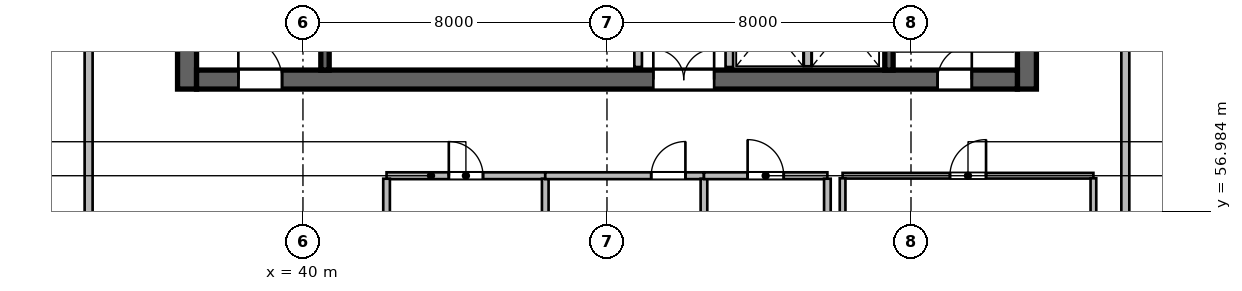
"""IFC4 building model, lengths in metres.
Left out: names, types, materials, properties, quantities, classifications, styles, units other than length and angle.
Written with IfcOpenShell. Run it as: python <this file> out.ifc"""

import sys

from ifc_helpers import new_model, si_unit, direction, frame, frame_2d, origin, place, context, subcontext, project, spatial, rectangle, extrude, source, transform, mapped, element, fill, save


model = new_model("IFC4")
c1 = context("Model", 3, precision=1e-05, world=origin(), true_north=direction((0.0, 1.0)))
c2 = subcontext(c1, "Body", "Model", "MODEL_VIEW")
j1 = project(units=[si_unit("LENGTHUNIT", "METRE"), si_unit("PLANEANGLEUNIT", "RADIAN")], contexts=[c1])
p1 = place(None, origin())
s1 = spatial("IfcSite", under=j1, at=p1, CompositionType="ELEMENT")
p2 = place(p1, origin())
s2 = spatial("IfcBuilding", under=s1, at=p2, CompositionType="ELEMENT")
p3 = place(p2, frame((0.0, 0.0, 131.1)))
s3 = spatial("IfcBuildingStorey", under=s2, at=p3, CompositionType="ELEMENT", Elevation=131.1)
m1 = source(origin(), c2, "Body", "SweptSolid", [
    extrude(rectangle(XDim=12.0, YDim=0.5, at=frame_2d((6.0, 0.0))), origin(), (0.0, 0.0, 1.0), 3.9),
])
for number, where, z_axis, x_axis in (
    (1, (36.95, 60.2, 0.0), (0.0, 0.0, 1.0), (0.0, 1.0, 0.0)),
    (2, (59.05, 60.2, 0.0), (0.0, 0.0, 1.0), (0.0, 1.0, 0.0)),
):
    element("IfcWall", number, at=place(p3, frame(where, z_axis=z_axis, x_axis=x_axis)), inside=s3, PredefinedType="SHEAR", context=c2, shape_type="MappedRepresentation", body=[
        mapped(m1, transform((0.0, 0.0, 0.0), scale=1.0)),
    ])
m2 = source(origin(), c2, "Body", "SweptSolid", [
    extrude(rectangle(XDim=21.6, YDim=0.5, at=frame_2d((10.8, 0.0))), origin(), (0.0, 0.0, 1.0), 3.9),
])
p4 = place(p3, frame((37.2, 60.45, 0.0), z_axis=(0.0, 0.0, 1.0), x_axis=(1.0, 0.0, 0.0)))
e3 = element("IfcWall", 3, at=p4, inside=s3, PredefinedType="SHEAR", context=c2, shape_type="MappedRepresentation", body=[
    mapped(m2, transform((0.0, 0.0, 0.0), scale=1.0)),
])
p5 = place(p4, frame((1.1, 0.0, 0.0)))
e4 = element("IfcOpeningElement", 4, at=p5, cuts=e3, PredefinedType="OPENING", context=c2, shape_type="SweptSolid", body=[
    extrude(rectangle(XDim=1.15, YDim=2.15, at=frame_2d((0.575, 1.075))), frame((0.0, 0.26, 0.0), z_axis=(0.0, -1.0, 0.0), x_axis=(1.0, 0.0, 0.0)), (0.0, 0.0, 1.0), 0.52),
])
p6 = place(p4, frame((19.5, 0.0, 0.0)))
e5 = element("IfcOpeningElement", 5, at=p6, cuts=e3, PredefinedType="OPENING", context=c2, shape_type="SweptSolid", body=[
    extrude(rectangle(XDim=0.9, YDim=2.1, at=frame_2d((0.45, 1.05))), frame((0.0, 0.26, 0.0), z_axis=(0.0, -1.0, 0.0), x_axis=(1.0, 0.0, 0.0)), (0.0, 0.0, 1.0), 0.52),
])
p7 = place(p4, frame((12.02, 0.0, 0.0)))
e6 = element("IfcOpeningElement", 6, at=p7, cuts=e3, PredefinedType="OPENING", context=c2, shape_type="SweptSolid", body=[
    extrude(rectangle(XDim=1.6, YDim=2.15, at=frame_2d((0.8, 1.075))), frame((0.0, 0.26, 0.0), z_axis=(0.0, -1.0, 0.0), x_axis=(1.0, 0.0, 0.0)), (0.0, 0.0, 1.0), 0.52),
])
m3 = source(origin(), c2, "Body", "SweptSolid", [
    extrude(rectangle(XDim=11.0, YDim=0.22, at=frame_2d((5.5, 0.0))), origin(), (0.0, 0.0, 1.0), 3.9),
])
p8 = place(p3, frame((40.58, 60.7, 0.0), z_axis=(0.0, 0.0, 1.0), x_axis=(0.0, 1.0, 0.0)))
e7 = element("IfcWall", 7, at=p8, inside=s3, PredefinedType="SHEAR", context=c2, shape_type="MappedRepresentation", body=[
    mapped(m3, transform((0.0, 0.0, 0.0), scale=1.0)),
])
p9 = place(p3, frame((55.42, 60.7, 0.0), z_axis=(0.0, 0.0, 1.0), x_axis=(0.0, 1.0, 0.0)))
e8 = element("IfcWall", 8, at=p9, inside=s3, PredefinedType="SHEAR", context=c2, shape_type="MappedRepresentation", body=[
    mapped(m3, transform((0.0, 0.0, 0.0), scale=1.0)),
])
p10 = place(p9, frame((9.545, 0.0, 0.0)))
e9 = element("IfcOpeningElement", 9, at=p10, cuts=e8, PredefinedType="OPENING", context=c2, shape_type="SweptSolid", body=[
    extrude(rectangle(XDim=1.15, YDim=2.15, at=frame_2d((0.575, 1.075))), frame((0.0, 0.12, 0.0), z_axis=(0.0, -1.0, 0.0), x_axis=(1.0, 0.0, 0.0)), (0.0, 0.0, 1.0), 0.24),
])
m4 = source(origin(), c2, "Body", "SweptSolid", [
    extrude(rectangle(XDim=2.24, YDim=0.2, at=frame_2d((1.12, 0.0))), origin(), (0.0, 0.0, 1.0), 3.65),
])
for number, where, z_axis, x_axis in (
    (10, (48.82, 60.78, 0.0), (0.0, 0.0, 1.0), (0.0, 1.0, 0.0)),
    (11, (51.22, 60.78, 0.0), (0.0, 0.0, 1.0), (0.0, 1.0, 0.0)),
):
    element("IfcWall", number, at=place(p3, frame(where, z_axis=z_axis, x_axis=x_axis)), inside=s3, PredefinedType="SOLIDWALL", context=c2, shape_type="MappedRepresentation", body=[
        mapped(m4, transform((0.0, 0.0, 0.0), scale=1.0)),
    ])
m5 = source(origin(), c2, "Body", "SweptSolid", [
    extrude(rectangle(XDim=2.2, YDim=0.2, at=frame_2d((1.1, 0.0))), origin(), (0.0, 0.0, 1.0), 3.65),
])
p11 = place(p3, frame((53.28, 60.8, 0.0), z_axis=(0.0, 0.0, 1.0), x_axis=(0.0, 1.0, 0.0)))
e12 = element("IfcWall", 12, at=p11, inside=s3, PredefinedType="SOLIDWALL", context=c2, shape_type="MappedRepresentation", body=[
    mapped(m5, transform((0.0, 0.0, 0.0), scale=1.0)),
])
m6 = source(origin(), c2, "Body", "SweptSolid", [
    extrude(rectangle(XDim=4.176, YDim=0.18, at=frame_2d((2.088, 0.0))), origin(), (0.0, 0.0, 1.0), 3.65),
])
p12 = place(p3, frame((42.2, 57.92, 0.0), z_axis=(0.0, 0.0, 1.0), x_axis=(1.0, 0.0, 0.0)))
e13 = element("IfcWall", 13, at=p12, inside=s3, PredefinedType="PLUMBINGWALL", context=c2, shape_type="MappedRepresentation", body=[
    mapped(m6, transform((0.0, 0.0, 0.0), scale=1.0)),
])
p13 = place(p12, frame((1.638, 0.0, 0.0)))
e14 = element("IfcOpeningElement", 14, at=p13, cuts=e13, PredefinedType="OPENING", context=c2, shape_type="SweptSolid", body=[
    extrude(rectangle(XDim=0.9, YDim=2.08, at=frame_2d((0.45, 1.04))), frame((0.0, 0.1, 0.0), z_axis=(0.0, -1.0, 0.0), x_axis=(1.0, 0.0, 0.0)), (0.0, 0.0, 1.0), 0.2),
])
m7 = source(origin(), c2, "Body", "SweptSolid", [
    extrude(rectangle(XDim=3.763, YDim=0.175, at=frame_2d((1.881, 0.0))), origin(), (0.0, 0.0, 1.0), 3.65),
])
for number, where, z_axis, x_axis in (
    (15, (42.2, 54.079, 0.0), (0.0, 0.0, 1.0), (0.0, 1.0, 0.0)),
    (16, (46.376, 54.079, 0.0), (0.0, 0.0, 1.0), (0.0, 1.0, 0.0)),
):
    element("IfcWall", number, at=place(p3, frame(where, z_axis=z_axis, x_axis=x_axis)), inside=s3, PredefinedType="PARTITIONING", context=c2, shape_type="MappedRepresentation", body=[
        mapped(m7, transform((0.0, 0.0, 0.0), scale=1.0)),
    ])
p14 = place(p3, frame((46.376, 57.92, 0.0), z_axis=(0.0, 0.0, 1.0), x_axis=(1.0, 0.0, 0.0)))
e17 = element("IfcWall", 17, at=p14, inside=s3, PredefinedType="PLUMBINGWALL", context=c2, shape_type="MappedRepresentation", body=[
    mapped(m6, transform((0.0, 0.0, 0.0), scale=1.0)),
])
p15 = place(p14, frame((2.788, 0.0, 0.0)))
e18 = element("IfcOpeningElement", 18, at=p15, cuts=e17, PredefinedType="OPENING", context=c2, shape_type="SweptSolid", body=[
    extrude(rectangle(XDim=0.9, YDim=2.08, at=frame_2d((0.45, 1.04))), frame((0.0, 0.1, 0.0), z_axis=(0.0, -1.0, 0.0), x_axis=(1.0, 0.0, 0.0)), (0.0, 0.0, 1.0), 0.2),
])
p16 = place(p3, frame((50.552, 54.079, 0.0), z_axis=(0.0, 0.0, 1.0), x_axis=(0.0, 1.0, 0.0)))
e19 = element("IfcWall", 19, at=p16, inside=s3, PredefinedType="PARTITIONING", context=c2, shape_type="MappedRepresentation", body=[
    mapped(m7, transform((0.0, 0.0, 0.0), scale=1.0)),
])
m8 = source(origin(), c2, "Body", "SweptSolid", [
    extrude(rectangle(XDim=3.248, YDim=0.18, at=frame_2d((1.624, 0.0))), origin(), (0.0, 0.0, 1.0), 3.65),
])
p17 = place(p3, frame((50.552, 57.92, 0.0), z_axis=(0.0, 0.0, 1.0), x_axis=(1.0, 0.0, 0.0)))
e20 = element("IfcWall", 20, at=p17, inside=s3, PredefinedType="PLUMBINGWALL", context=c2, shape_type="MappedRepresentation", body=[
    mapped(m8, transform((0.0, 0.0, 0.0), scale=1.0)),
])
p18 = place(p17, frame((1.149, 0.0, 0.0)))
e21 = element("IfcOpeningElement", 21, at=p18, cuts=e20, PredefinedType="OPENING", context=c2, shape_type="SweptSolid", body=[
    extrude(rectangle(XDim=0.95, YDim=2.12, at=frame_2d((0.475, 1.06))), frame((0.0, 0.1, 0.0), z_axis=(0.0, -1.0, 0.0), x_axis=(1.0, 0.0, 0.0)), (0.0, 0.0, 1.0), 0.2),
])
p19 = place(p3, frame((53.8, 54.079, 0.0), z_axis=(0.0, 0.0, 1.0), x_axis=(0.0, 1.0, 0.0)))
e22 = element("IfcWall", 22, at=p19, inside=s3, PredefinedType="PARTITIONING", context=c2, shape_type="MappedRepresentation", body=[
    mapped(m7, transform((0.0, 0.0, 0.0), scale=1.0)),
])
m9 = source(origin(), c2, "Body", "SweptSolid", [
    extrude(rectangle(XDim=6.6, YDim=0.15, at=frame_2d((3.3, 0.0))), origin(), (0.0, 0.0, 1.0), 3.65),
])
p20 = place(p3, frame((54.2, 57.92, 0.0), z_axis=(0.0, 0.0, 1.0), x_axis=(1.0, 0.0, 0.0)))
e23 = element("IfcWall", 23, at=p20, inside=s3, PredefinedType="PARTITIONING", context=c2, shape_type="MappedRepresentation", body=[
    mapped(m9, transform((0.0, 0.0, 0.0), scale=1.0)),
])
p21 = place(p20, frame((2.825, 0.0, 0.0)))
e24 = element("IfcOpeningElement", 24, at=p21, cuts=e23, PredefinedType="OPENING", context=c2, shape_type="SweptSolid", body=[
    extrude(rectangle(XDim=0.95, YDim=2.1, at=frame_2d((0.475, 1.05))), frame((0.0, 0.085, 0.0), z_axis=(0.0, -1.0, 0.0), x_axis=(1.0, 0.0, 0.0)), (0.0, 0.0, 1.0), 0.17),
])
m10 = source(origin(), c2, "Body", "SweptSolid", [
    extrude(rectangle(XDim=3.785, YDim=0.15, at=frame_2d((1.893, 0.0))), origin(), (0.0, 0.0, 1.0), 3.65),
])
for number, where, z_axis, x_axis in (
    (25, (54.2, 54.067, 0.0), (0.0, 0.0, 1.0), (0.0, 1.0, 0.0)),
    (26, (60.8, 54.067, 0.0), (0.0, 0.0, 1.0), (0.0, 1.0, 0.0)),
):
    element("IfcWall", number, at=place(p3, frame(where, z_axis=z_axis, x_axis=x_axis)), inside=s3, PredefinedType="PARTITIONING", context=c2, shape_type="MappedRepresentation", body=[
        mapped(m10, transform((0.0, 0.0, 0.0), scale=1.0)),
    ])
m11 = source(origin(), c2, "Body", "SweptSolid", [
    extrude(rectangle(XDim=13.988, YDim=0.21, at=frame_2d((6.994, 0.0))), origin(), (0.0, 0.0, 1.0), 3.65),
])
p22 = place(p3, frame((34.36, 47.472, 0.0), z_axis=(0.0, 0.0, 1.0), x_axis=(0.0, 1.0, 0.0)))
e27 = element("IfcWall", 27, at=p22, inside=s3, PredefinedType="PARTITIONING", context=c2, shape_type="MappedRepresentation", body=[
    mapped(m11, transform((0.0, 0.0, 0.0), scale=1.0)),
])
m12 = source(origin(), c2, "Body", "SweptSolid", [
    extrude(rectangle(XDim=13.988, YDim=0.21, at=frame_2d((6.994, 0.0))), origin(), (0.0, 0.0, 1.0), 2.942),
])
p23 = place(p3, frame((61.64, 47.472, 0.0), z_axis=(0.0, 0.0, 1.0), x_axis=(0.0, 1.0, 0.0)))
e28 = element("IfcWall", 28, at=p23, inside=s3, PredefinedType="PARTITIONING", context=c2, shape_type="MappedRepresentation", body=[
    mapped(m12, transform((0.0, 0.0, 0.0), scale=1.0)),
])
m13 = source(origin(), c2, "Body", "SweptSolid", [
    extrude(rectangle(XDim=1.15, YDim=2.15, at=frame_2d((0.575, 1.075))), frame((0.0, 0.025, 0.0), z_axis=(0.0, -1.0, 0.0), x_axis=(1.0, 0.0, 0.0)), (0.0, 0.0, 1.0), 0.05),
])
p24 = place(p5, origin())
e29 = element("IfcDoor", 29, at=p24, inside=s3, OperationType="SINGLE_SWING_LEFT", PredefinedType="DOOR", context=c2, shape_type="MappedRepresentation", body=[
    mapped(m13, transform((0.0, 0.0, 0.0), scale=1.0)),
])
fill(e4, e29)
m14 = source(origin(), c2, "Body", "SweptSolid", [
    extrude(rectangle(XDim=0.9, YDim=2.1, at=frame_2d((0.45, 1.05))), frame((0.0, 0.025, 0.0), z_axis=(0.0, -1.0, 0.0), x_axis=(1.0, 0.0, 0.0)), (0.0, 0.0, 1.0), 0.05),
])
p25 = place(p6, origin())
e30 = element("IfcDoor", 30, at=p25, inside=s3, OperationType="SINGLE_SWING_RIGHT", PredefinedType="DOOR", context=c2, shape_type="MappedRepresentation", body=[
    mapped(m14, transform((0.0, 0.0, 0.0), scale=1.0)),
])
fill(e5, e30)
m15 = source(origin(), c2, "Body", "SweptSolid", [
    extrude(rectangle(XDim=1.6, YDim=2.15, at=frame_2d((0.8, 1.075))), frame((0.0, 0.025, 0.0), z_axis=(0.0, -1.0, 0.0), x_axis=(1.0, 0.0, 0.0)), (0.0, 0.0, 1.0), 0.05),
])
p26 = place(p7, origin())
e31 = element("IfcDoor", 31, at=p26, inside=s3, OperationType="DOUBLE_DOOR_SINGLE_SWING", PredefinedType="DOOR", context=c2, shape_type="MappedRepresentation", body=[
    mapped(m15, transform((0.0, 0.0, 0.0), scale=1.0)),
])
fill(e6, e31)
m16 = source(origin(), c2, "Body", "SweptSolid", [
    extrude(rectangle(XDim=0.9, YDim=2.08, at=frame_2d((0.45, 1.04))), frame((0.0, 0.025, 0.0), z_axis=(0.0, -1.0, 0.0), x_axis=(1.0, 0.0, 0.0)), (0.0, 0.0, 1.0), 0.05),
])
p27 = place(p13, origin())
e32 = element("IfcDoor", 32, at=p27, inside=s3, OperationType="SINGLE_SWING_LEFT", PredefinedType="DOOR", context=c2, shape_type="MappedRepresentation", body=[
    mapped(m16, transform((0.0, 0.0, 0.0), scale=1.0)),
])
fill(e14, e32)
p28 = place(p15, origin())
e33 = element("IfcDoor", 33, at=p28, inside=s3, OperationType="SINGLE_SWING_RIGHT", PredefinedType="DOOR", context=c2, shape_type="MappedRepresentation", body=[
    mapped(m16, transform((0.0, 0.0, 0.0), scale=1.0)),
])
fill(e18, e33)
m17 = source(origin(), c2, "Body", "SweptSolid", [
    extrude(rectangle(XDim=0.95, YDim=2.12, at=frame_2d((0.475, 1.06))), frame((0.0, 0.025, 0.0), z_axis=(0.0, -1.0, 0.0), x_axis=(1.0, 0.0, 0.0)), (0.0, 0.0, 1.0), 0.05),
])
p29 = place(p18, origin())
e34 = element("IfcDoor", 34, at=p29, inside=s3, OperationType="SINGLE_SWING_LEFT", PredefinedType="DOOR", context=c2, shape_type="MappedRepresentation", body=[
    mapped(m17, transform((0.0, 0.0, 0.0), scale=1.0)),
])
fill(e21, e34)
m18 = source(origin(), c2, "Body", "SweptSolid", [
    extrude(rectangle(XDim=0.95, YDim=2.1, at=frame_2d((0.475, 1.05))), frame((0.0, 0.025, 0.0), z_axis=(0.0, -1.0, 0.0), x_axis=(1.0, 0.0, 0.0)), (0.0, 0.0, 1.0), 0.05),
])
p30 = place(p21, origin())
e35 = element("IfcDoor", 35, at=p30, inside=s3, OperationType="SINGLE_SWING_RIGHT", PredefinedType="DOOR", context=c2, shape_type="MappedRepresentation", body=[
    mapped(m18, transform((0.0, 0.0, 0.0), scale=1.0)),
])
fill(e24, e35)
save(model, sys.argv[1])
